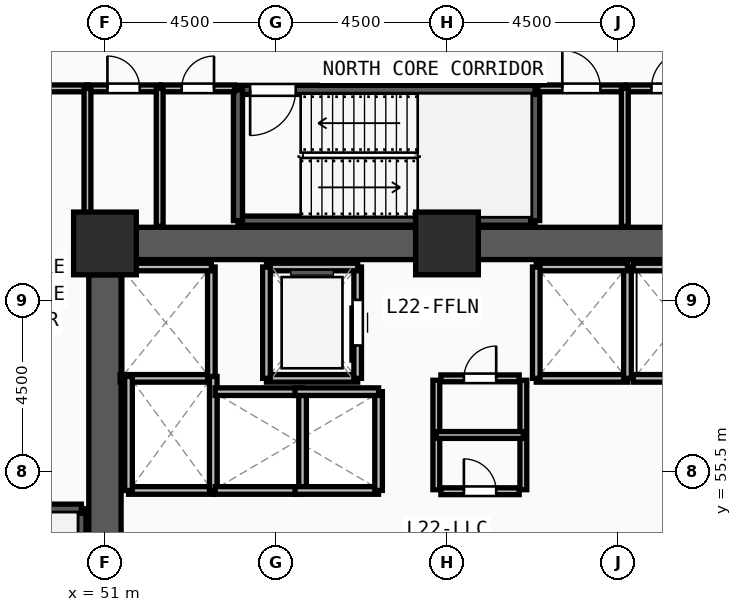
"""IFC4 building model, lengths in metres.
Left out: names, types, materials, properties, quantities, classifications, styles, units other than length and angle.
Written with IfcOpenShell. Run it as: python <this file> out.ifc"""

import sys

from ifc_helpers import new_model, si_unit, direction, frame, frame_2d, origin, origin_2d, place, context, subcontext, project, spatial, rectangle, extrude, source, transform, mapped, element, fill, save


model = new_model("IFC4")
c1 = context("Model", 3, precision=1e-05, world=origin(), true_north=direction((0.0, 1.0)))
c2 = subcontext(c1, "Body", "Model", "MODEL_VIEW")
j1 = project(units=[si_unit("LENGTHUNIT", "METRE"), si_unit("PLANEANGLEUNIT", "RADIAN")], contexts=[c1])
p1 = place(None, origin())
s1 = spatial("IfcSite", under=j1, at=p1, CompositionType="ELEMENT")
p2 = place(p1, origin())
s2 = spatial("IfcBuilding", under=s1, at=p2, CompositionType="ELEMENT")
p3 = place(p2, frame((0.0, 0.0, 85.5)))
s3 = spatial("IfcBuildingStorey", under=s2, at=p3, CompositionType="ELEMENT", Elevation=85.5)
m1 = source(origin(), c2, "Body", "SweptSolid", [
    extrude(rectangle(XDim=1.65, YDim=1.65, at=origin_2d()), origin(), (0.0, 0.0, 1.0), 3.75),
])
for number, where, z_axis, x_axis in (
    (1, (60.0, 61.5, 0.0), (0.0, 0.0, 1.0), (1.0, 0.0, 0.0)),
    (2, (51.0, 61.5, 0.0), (0.0, 0.0, 1.0), (1.0, 0.0, 0.0)),
):
    element("IfcColumn", number, at=place(p3, frame(where, z_axis=z_axis, x_axis=x_axis)), inside=s3, PredefinedType="COLUMN", context=c2, shape_type="MappedRepresentation", body=[
        mapped(m1, transform((0.0, 0.0, 0.0), x_axis=(1.0, 0.0, 0.0), y_axis=(0.0, 1.0, 0.0), z_axis=(0.0, 0.0, 1.0), scale=1.0)),
    ])
for number, where, z_axis, x_axis in (
    (3, (51.825, 61.5, 0.0), (0.0, 0.0, 1.0), (1.0, 0.0, 0.0)),
    (4, (60.825, 61.5, 0.0), (0.0, 0.0, 1.0), (1.0, 0.0, 0.0)),
):
    element("IfcWall", number, at=place(p3, frame(where, z_axis=z_axis, x_axis=x_axis)), inside=s3, PredefinedType="SHEAR", context=c2, shape_type="SweptSolid", body=[
        extrude(rectangle(XDim=7.35, YDim=0.85, at=frame_2d((3.675, 0.0))), origin(), (0.0, 0.0, 1.0), 3.57),
    ])
p4 = place(p3, frame((51.0, 47.325, 0.0), z_axis=(0.0, 0.0, 1.0), x_axis=(0.0, 1.0, 0.0)))
e5 = element("IfcWall", 5, at=p4, inside=s3, PredefinedType="SHEAR", context=c2, shape_type="SweptSolid", body=[
    extrude(rectangle(XDim=13.35, YDim=0.85, at=frame_2d((6.675, 0.0))), origin(), (0.0, 0.0, 1.0), 3.57),
])
p5 = place(p3, frame((50.38, 46.7, 0.0), z_axis=(0.0, 0.0, 1.0), x_axis=(0.0, 1.0, 0.0)))
e6 = element("IfcWall", 6, at=p5, inside=s3, PredefinedType="SOLIDWALL", context=c2, shape_type="SweptSolid", body=[
    extrude(rectangle(XDim=7.82, YDim=0.24, at=frame_2d((3.91, 0.0))), origin(), (0.0, 0.0, 1.0), 3.57),
])
p6 = place(p3, frame((50.38, 54.52, 0.0), z_axis=(0.0, 0.0, 1.0), x_axis=(-1.0, 0.0, 0.0)))
e7 = element("IfcWall", 7, at=p6, inside=s3, PredefinedType="SOLIDWALL", context=c2, shape_type="SweptSolid", body=[
    extrude(rectangle(XDim=3.44, YDim=0.24, at=frame_2d((1.72, 0.0))), origin(), (0.0, 0.0, 1.0), 3.57),
])
p7 = place(p3, frame((54.5, 62.1, 0.0), z_axis=(0.0, 0.0, 1.0), x_axis=(1.0, 0.0, 0.0)))
e8 = element("IfcWall", 8, at=p7, inside=s3, PredefinedType="SOLIDWALL", context=c2, shape_type="SweptSolid", body=[
    extrude(rectangle(XDim=7.82, YDim=0.24, at=frame_2d((3.91, 0.0))), origin(), (0.0, 0.0, 1.0), 3.57),
])
p8 = place(p3, frame((62.32, 62.1, 0.0), z_axis=(0.0, 0.0, 1.0), x_axis=(0.0, 1.0, 0.0)))
e9 = element("IfcWall", 9, at=p8, inside=s3, PredefinedType="SOLIDWALL", context=c2, shape_type="SweptSolid", body=[
    extrude(rectangle(XDim=3.44, YDim=0.24, at=frame_2d((1.72, 0.0))), origin(), (0.0, 0.0, 1.0), 3.57),
])
p9 = place(p3, frame((62.32, 65.54, 0.0), z_axis=(0.0, 0.0, 1.0), x_axis=(-1.0, 0.0, 0.0)))
e10 = element("IfcWall", 10, at=p9, inside=s3, PredefinedType="SOLIDWALL", context=c2, shape_type="SweptSolid", body=[
    extrude(rectangle(XDim=7.82, YDim=0.24, at=frame_2d((3.91, 0.0))), origin(), (0.0, 0.0, 1.0), 3.57),
])
m2 = source(origin(), c2, "Body", "SweptSolid", [
    extrude(rectangle(XDim=1.2, YDim=2.2, at=frame_2d((0.6, 1.1))), frame((0.0, 0.13, 0.0), z_axis=(0.0, -1.0, 0.0), x_axis=(1.0, 0.0, 0.0)), (0.0, 0.0, 1.0), 0.26),
])
p10 = place(p9, frame((6.3, 0.0, 0.0)))
e11 = element("IfcOpeningElement", 11, at=p10, cuts=e10, PredefinedType="OPENING", context=c2, shape_type="MappedRepresentation", body=[
    mapped(m2, transform((0.0, 0.0, 0.0), x_axis=(1.0, 0.0, 0.0), y_axis=(0.0, 1.0, 0.0), z_axis=(0.0, 0.0, 1.0), scale=1.0)),
])
p11 = place(p3, frame((54.5, 65.54, 0.0), z_axis=(0.0, 0.0, 1.0), x_axis=(0.0, -1.0, 0.0)))
e12 = element("IfcWall", 12, at=p11, inside=s3, PredefinedType="SOLIDWALL", context=c2, shape_type="SweptSolid", body=[
    extrude(rectangle(XDim=3.44, YDim=0.24, at=frame_2d((1.72, 0.0))), origin(), (0.0, 0.0, 1.0), 3.57),
])
p12 = place(p3, frame((55.25, 57.95, 0.0), z_axis=(0.0, 0.0, 1.0), x_axis=(1.0, 0.0, 0.0)))
e13 = element("IfcWall", 13, at=p12, inside=s3, PredefinedType="SOLIDWALL", context=c2, shape_type="SweptSolid", body=[
    extrude(rectangle(XDim=2.4, YDim=0.2, at=frame_2d((1.2, 0.0))), origin(), (0.0, 0.0, 1.0), 3.57),
])
p13 = place(p3, frame((57.65, 57.95, 0.0), z_axis=(0.0, 0.0, 1.0), x_axis=(0.0, 1.0, 0.0)))
e14 = element("IfcWall", 14, at=p13, inside=s3, PredefinedType="SOLIDWALL", context=c2, shape_type="SweptSolid", body=[
    extrude(rectangle(XDim=2.93, YDim=0.2, at=frame_2d((1.465, 0.0))), origin(), (0.0, 0.0, 1.0), 3.57),
])
m3 = source(origin(), c2, "Body", "SweptSolid", [
    extrude(rectangle(XDim=1.2, YDim=2.3, at=frame_2d((0.6, 1.15))), frame((0.0, 0.11, 0.0), z_axis=(0.0, -1.0, 0.0), x_axis=(1.0, 0.0, 0.0)), (0.0, 0.0, 1.0), 0.22),
])
p14 = place(p13, frame((0.865, 0.0, 0.0)))
e15 = element("IfcOpeningElement", 15, at=p14, cuts=e14, PredefinedType="OPENING", context=c2, shape_type="MappedRepresentation", body=[
    mapped(m3, transform((0.0, 0.0, 0.0), x_axis=(1.0, 0.0, 0.0), y_axis=(0.0, 1.0, 0.0), z_axis=(0.0, 0.0, 1.0), scale=1.0)),
])
p15 = place(p3, frame((57.65, 60.88, 0.0), z_axis=(0.0, 0.0, 1.0), x_axis=(-1.0, 0.0, 0.0)))
e16 = element("IfcWall", 16, at=p15, inside=s3, PredefinedType="SOLIDWALL", context=c2, shape_type="SweptSolid", body=[
    extrude(rectangle(XDim=2.4, YDim=0.2, at=frame_2d((1.2, 0.0))), origin(), (0.0, 0.0, 1.0), 3.57),
])
p16 = place(p3, frame((55.25, 60.88, 0.0), z_axis=(0.0, 0.0, 1.0), x_axis=(0.0, -1.0, 0.0)))
e17 = element("IfcWall", 17, at=p16, inside=s3, PredefinedType="SOLIDWALL", context=c2, shape_type="SweptSolid", body=[
    extrude(rectangle(XDim=2.93, YDim=0.2, at=frame_2d((1.465, 0.0))), origin(), (0.0, 0.0, 1.0), 3.57),
])
p17 = place(p3, frame((62.35, 57.95, 0.0), z_axis=(0.0, 0.0, 1.0), x_axis=(1.0, 0.0, 0.0)))
e18 = element("IfcWall", 18, at=p17, inside=s3, PredefinedType="SOLIDWALL", context=c2, shape_type="SweptSolid", body=[
    extrude(rectangle(XDim=2.4, YDim=0.2, at=frame_2d((1.2, 0.0))), origin(), (0.0, 0.0, 1.0), 3.57),
])
p18 = place(p3, frame((64.75, 57.95, 0.0), z_axis=(0.0, 0.0, 1.0), x_axis=(0.0, 1.0, 0.0)))
e19 = element("IfcWall", 19, at=p18, inside=s3, PredefinedType="SOLIDWALL", context=c2, shape_type="SweptSolid", body=[
    extrude(rectangle(XDim=2.93, YDim=0.2, at=frame_2d((1.465, 0.0))), origin(), (0.0, 0.0, 1.0), 3.57),
])
p19 = place(p3, frame((64.75, 60.88, 0.0), z_axis=(0.0, 0.0, 1.0), x_axis=(-1.0, 0.0, 0.0)))
e20 = element("IfcWall", 20, at=p19, inside=s3, PredefinedType="SOLIDWALL", context=c2, shape_type="SweptSolid", body=[
    extrude(rectangle(XDim=2.4, YDim=0.2, at=frame_2d((1.2, 0.0))), origin(), (0.0, 0.0, 1.0), 3.57),
])
p20 = place(p3, frame((62.35, 60.88, 0.0), z_axis=(0.0, 0.0, 1.0), x_axis=(0.0, -1.0, 0.0)))
e21 = element("IfcWall", 21, at=p20, inside=s3, PredefinedType="SOLIDWALL", context=c2, shape_type="SweptSolid", body=[
    extrude(rectangle(XDim=2.93, YDim=0.2, at=frame_2d((1.465, 0.0))), origin(), (0.0, 0.0, 1.0), 3.57),
])
for number, where, z_axis, x_axis in (
    (22, (64.9, 57.95, 0.0), (0.0, 0.0, 1.0), (1.0, 0.0, 0.0)),
    (23, (67.3, 60.88, 0.0), (0.0, 0.0, 1.0), (-1.0, 0.0, 0.0)),
    (24, (51.4, 57.95, 0.0), (0.0, 0.0, 1.0), (1.0, 0.0, 0.0)),
):
    element("IfcWall", number, at=place(p3, frame(where, z_axis=z_axis, x_axis=x_axis)), inside=s3, PredefinedType="SOLIDWALL", context=c2, shape_type="SweptSolid", body=[
        extrude(rectangle(XDim=2.4, YDim=0.2, at=frame_2d((1.2, 0.0))), origin(), (0.0, 0.0, 1.0), 3.57),
    ])
p21 = place(p3, frame((53.8, 57.95, 0.0), z_axis=(0.0, 0.0, 1.0), x_axis=(0.0, 1.0, 0.0)))
e25 = element("IfcWall", 25, at=p21, inside=s3, PredefinedType="SOLIDWALL", context=c2, shape_type="SweptSolid", body=[
    extrude(rectangle(XDim=2.93, YDim=0.2, at=frame_2d((1.465, 0.0))), origin(), (0.0, 0.0, 1.0), 3.57),
])
p22 = place(p3, frame((53.8, 60.88, 0.0), z_axis=(0.0, 0.0, 1.0), x_axis=(-1.0, 0.0, 0.0)))
e26 = element("IfcWall", 26, at=p22, inside=s3, PredefinedType="SOLIDWALL", context=c2, shape_type="SweptSolid", body=[
    extrude(rectangle(XDim=2.4, YDim=0.2, at=frame_2d((1.2, 0.0))), origin(), (0.0, 0.0, 1.0), 3.57),
])
p23 = place(p3, frame((51.62, 55.0, 0.0), z_axis=(0.0, 0.0, 1.0), x_axis=(1.0, 0.0, 0.0)))
e27 = element("IfcWall", 27, at=p23, inside=s3, PredefinedType="SOLIDWALL", context=c2, shape_type="SweptSolid", body=[
    extrude(rectangle(XDim=2.23, YDim=0.2, at=frame_2d((1.115, 0.0))), origin(), (0.0, 0.0, 1.0), 3.57),
])
for number, where, z_axis, x_axis in (
    (28, (53.85, 55.0, 0.0), (0.0, 0.0, 1.0), (0.0, 1.0, 0.0)),
    (29, (51.62, 58.0, 0.0), (0.0, 0.0, 1.0), (0.0, -1.0, 0.0)),
):
    element("IfcWall", number, at=place(p3, frame(where, z_axis=z_axis, x_axis=x_axis)), inside=s3, PredefinedType="SOLIDWALL", context=c2, shape_type="SweptSolid", body=[
        extrude(rectangle(XDim=3.0, YDim=0.2, at=frame_2d((1.5, 0.0))), origin(), (0.0, 0.0, 1.0), 3.57),
    ])
p24 = place(p3, frame((53.9, 55.0, 0.0), z_axis=(0.0, 0.0, 1.0), x_axis=(1.0, 0.0, 0.0)))
e30 = element("IfcWall", 30, at=p24, inside=s3, PredefinedType="SOLIDWALL", context=c2, shape_type="SweptSolid", body=[
    extrude(rectangle(XDim=2.3, YDim=0.2, at=frame_2d((1.15, 0.0))), origin(), (0.0, 0.0, 1.0), 3.57),
])
p25 = place(p3, frame((56.2, 55.0, 0.0), z_axis=(0.0, 0.0, 1.0), x_axis=(0.0, 1.0, 0.0)))
e31 = element("IfcWall", 31, at=p25, inside=s3, PredefinedType="SOLIDWALL", context=c2, shape_type="SweptSolid", body=[
    extrude(rectangle(XDim=2.6, YDim=0.2, at=frame_2d((1.3, 0.0))), origin(), (0.0, 0.0, 1.0), 3.57),
])
p26 = place(p3, frame((56.2, 57.6, 0.0), z_axis=(0.0, 0.0, 1.0), x_axis=(-1.0, 0.0, 0.0)))
e32 = element("IfcWall", 32, at=p26, inside=s3, PredefinedType="SOLIDWALL", context=c2, shape_type="SweptSolid", body=[
    extrude(rectangle(XDim=2.3, YDim=0.2, at=frame_2d((1.15, 0.0))), origin(), (0.0, 0.0, 1.0), 3.57),
])
p27 = place(p3, frame((56.0, 55.0, 0.0), z_axis=(0.0, 0.0, 1.0), x_axis=(1.0, 0.0, 0.0)))
e33 = element("IfcWall", 33, at=p27, inside=s3, PredefinedType="SOLIDWALL", context=c2, shape_type="SweptSolid", body=[
    extrude(rectangle(XDim=2.2, YDim=0.2, at=frame_2d((1.1, 0.0))), origin(), (0.0, 0.0, 1.0), 3.57),
])
p28 = place(p3, frame((58.2, 55.0, 0.0), z_axis=(0.0, 0.0, 1.0), x_axis=(0.0, 1.0, 0.0)))
e34 = element("IfcWall", 34, at=p28, inside=s3, PredefinedType="SOLIDWALL", context=c2, shape_type="SweptSolid", body=[
    extrude(rectangle(XDim=2.6, YDim=0.2, at=frame_2d((1.3, 0.0))), origin(), (0.0, 0.0, 1.0), 3.57),
])
p29 = place(p3, frame((58.2, 57.6, 0.0), z_axis=(0.0, 0.0, 1.0), x_axis=(-1.0, 0.0, 0.0)))
e35 = element("IfcWall", 35, at=p29, inside=s3, PredefinedType="SOLIDWALL", context=c2, shape_type="SweptSolid", body=[
    extrude(rectangle(XDim=2.2, YDim=0.2, at=frame_2d((1.1, 0.0))), origin(), (0.0, 0.0, 1.0), 3.57),
])
p30 = place(p3, frame((59.84, 54.98, 0.0), z_axis=(0.0, 0.0, 1.0), x_axis=(1.0, 0.0, 0.0)))
e36 = element("IfcWall", 36, at=p30, inside=s3, PredefinedType="PARTITIONING", context=c2, shape_type="SweptSolid", body=[
    extrude(rectangle(XDim=2.06, YDim=0.18, at=frame_2d((1.03, 0.0))), origin(), (0.0, 0.0, 1.0), 3.57),
])
m4 = source(origin(), c2, "Body", "SweptSolid", [
    extrude(rectangle(XDim=0.85, YDim=2.1, at=frame_2d((0.425, 1.05))), frame((0.0, 0.1, 0.0), z_axis=(0.0, -1.0, 0.0), x_axis=(1.0, 0.0, 0.0)), (0.0, 0.0, 1.0), 0.2),
])
p31 = place(p30, frame((0.605, 0.0, 0.0)))
e37 = element("IfcOpeningElement", 37, at=p31, cuts=e36, PredefinedType="OPENING", context=c2, shape_type="MappedRepresentation", body=[
    mapped(m4, transform((0.0, 0.0, 0.0), x_axis=(1.0, 0.0, 0.0), y_axis=(0.0, 1.0, 0.0), z_axis=(0.0, 0.0, 1.0), scale=1.0)),
])
p32 = place(p3, frame((59.84, 57.95, 0.0), z_axis=(0.0, 0.0, 1.0), x_axis=(1.0, 0.0, 0.0)))
e38 = element("IfcWall", 38, at=p32, inside=s3, PredefinedType="PARTITIONING", context=c2, shape_type="SweptSolid", body=[
    extrude(rectangle(XDim=2.06, YDim=0.18, at=frame_2d((1.03, 0.0))), origin(), (0.0, 0.0, 1.0), 3.57),
])
p33 = place(p32, frame((0.605, 0.0, 0.0)))
e39 = element("IfcOpeningElement", 39, at=p33, cuts=e38, PredefinedType="OPENING", context=c2, shape_type="MappedRepresentation", body=[
    mapped(m4, transform((0.0, 0.0, 0.0), x_axis=(1.0, 0.0, 0.0), y_axis=(0.0, 1.0, 0.0), z_axis=(0.0, 0.0, 1.0), scale=1.0)),
])
p34 = place(p3, frame((50.54, 65.58, 0.0), z_axis=(0.0, 0.0, 1.0), x_axis=(1.0, 0.0, 0.0)))
e40 = element("IfcWall", 40, at=p34, inside=s3, PredefinedType="PARTITIONING", context=c2, shape_type="SweptSolid", body=[
    extrude(rectangle(XDim=1.9, YDim=0.18, at=frame_2d((0.95, 0.0))), origin(), (0.0, 0.0, 1.0), 3.57),
])
p35 = place(p34, frame((0.525, 0.0, 0.0)))
e41 = element("IfcOpeningElement", 41, at=p35, cuts=e40, PredefinedType="OPENING", context=c2, shape_type="MappedRepresentation", body=[
    mapped(m4, transform((0.0, 0.0, 0.0), x_axis=(1.0, 0.0, 0.0), y_axis=(0.0, 1.0, 0.0), z_axis=(0.0, 0.0, 1.0), scale=1.0)),
])
p36 = place(p3, frame((52.48, 65.58, 0.0), z_axis=(0.0, 0.0, 1.0), x_axis=(1.0, 0.0, 0.0)))
e42 = element("IfcWall", 42, at=p36, inside=s3, PredefinedType="PARTITIONING", context=c2, shape_type="SweptSolid", body=[
    extrude(rectangle(XDim=1.93, YDim=0.18, at=frame_2d((0.965, 0.0))), origin(), (0.0, 0.0, 1.0), 3.57),
])
p37 = place(p36, frame((0.54, 0.0, 0.0)))
e43 = element("IfcOpeningElement", 43, at=p37, cuts=e42, PredefinedType="OPENING", context=c2, shape_type="MappedRepresentation", body=[
    mapped(m4, transform((0.0, 0.0, 0.0), x_axis=(1.0, 0.0, 0.0), y_axis=(0.0, 1.0, 0.0), z_axis=(0.0, 0.0, 1.0), scale=1.0)),
])
p38 = place(p3, frame((62.39, 65.58, 0.0), z_axis=(0.0, 0.0, 1.0), x_axis=(1.0, 0.0, 0.0)))
e44 = element("IfcWall", 44, at=p38, inside=s3, PredefinedType="PARTITIONING", context=c2, shape_type="SweptSolid", body=[
    extrude(rectangle(XDim=2.29, YDim=0.18, at=frame_2d((1.145, 0.0))), origin(), (0.0, 0.0, 1.0), 3.57),
])
m5 = source(origin(), c2, "Body", "SweptSolid", [
    extrude(rectangle(XDim=1.0, YDim=2.2, at=frame_2d((0.5, 1.1))), frame((0.0, 0.1, 0.0), z_axis=(0.0, -1.0, 0.0), x_axis=(1.0, 0.0, 0.0)), (0.0, 0.0, 1.0), 0.2),
])
p39 = place(p38, frame((0.645, 0.0, 0.0)))
e45 = element("IfcOpeningElement", 45, at=p39, cuts=e44, PredefinedType="OPENING", context=c2, shape_type="MappedRepresentation", body=[
    mapped(m5, transform((0.0, 0.0, 0.0), x_axis=(1.0, 0.0, 0.0), y_axis=(0.0, 1.0, 0.0), z_axis=(0.0, 0.0, 1.0), scale=1.0)),
])
p40 = place(p3, frame((64.72, 65.58, 0.0), z_axis=(0.0, 0.0, 1.0), x_axis=(1.0, 0.0, 0.0)))
e46 = element("IfcWall", 46, at=p40, inside=s3, PredefinedType="PARTITIONING", context=c2, shape_type="SweptSolid", body=[
    extrude(rectangle(XDim=2.32, YDim=0.18, at=frame_2d((1.16, 0.0))), origin(), (0.0, 0.0, 1.0), 3.57),
])
p41 = place(p40, frame((0.66, 0.0, 0.0)))
e47 = element("IfcOpeningElement", 47, at=p41, cuts=e46, PredefinedType="OPENING", context=c2, shape_type="MappedRepresentation", body=[
    mapped(m5, transform((0.0, 0.0, 0.0), x_axis=(1.0, 0.0, 0.0), y_axis=(0.0, 1.0, 0.0), z_axis=(0.0, 0.0, 1.0), scale=1.0)),
])
p42 = place(p3, frame((46.7, 65.58, 0.0), z_axis=(0.0, 0.0, 1.0), x_axis=(1.0, 0.0, 0.0)))
e48 = element("IfcWall", 48, at=p42, inside=s3, PredefinedType="PARTITIONING", context=c2, shape_type="SweptSolid", body=[
    extrude(rectangle(XDim=3.84, YDim=0.18, at=frame_2d((1.92, 0.0))), origin(), (0.0, 0.0, 1.0), 3.57),
])
m6 = source(origin(), c2, "Body", "SweptSolid", [
    extrude(rectangle(XDim=1.3, YDim=2.2, at=frame_2d((0.65, 1.1))), frame((0.0, 0.1, 0.0), z_axis=(0.0, -1.0, 0.0), x_axis=(1.0, 0.0, 0.0)), (0.0, 0.0, 1.0), 0.2),
])
p43 = place(p42, frame((1.27, 0.0, 0.0)))
e49 = element("IfcOpeningElement", 49, at=p43, cuts=e48, PredefinedType="OPENING", context=c2, shape_type="MappedRepresentation", body=[
    mapped(m6, transform((0.0, 0.0, 0.0), x_axis=(1.0, 0.0, 0.0), y_axis=(0.0, 1.0, 0.0), z_axis=(0.0, 0.0, 1.0), scale=1.0)),
])
for number, where, z_axis, x_axis in (
    (50, (59.72, 55.02, 0.0), (0.0, 0.0, 1.0), (0.0, 1.0, 0.0)),
    (51, (62.01, 55.02, 0.0), (0.0, 0.0, 1.0), (0.0, 1.0, 0.0)),
):
    element("IfcWall", number, at=place(p3, frame(where, z_axis=z_axis, x_axis=x_axis)), inside=s3, PredefinedType="PARTITIONING", context=c2, shape_type="SweptSolid", body=[
        extrude(rectangle(XDim=2.88, YDim=0.18, at=frame_2d((1.44, 0.0))), origin(), (0.0, 0.0, 1.0), 3.57),
    ])
p44 = place(p3, frame((59.72, 56.46, 0.0), z_axis=(0.0, 0.0, 1.0), x_axis=(1.0, 0.0, 0.0)))
e52 = element("IfcWall", 52, at=p44, inside=s3, PredefinedType="PARTITIONING", context=c2, shape_type="SweptSolid", body=[
    extrude(rectangle(XDim=2.29, YDim=0.18, at=frame_2d((1.145, 0.0))), origin(), (0.0, 0.0, 1.0), 3.57),
])
for number, where, z_axis, x_axis in (
    (53, (50.54, 61.95, 0.0), (0.0, 0.0, 1.0), (0.0, 1.0, 0.0)),
    (54, (52.44, 61.95, 0.0), (0.0, 0.0, 1.0), (0.0, 1.0, 0.0)),
    (55, (64.68, 61.95, 0.0), (0.0, 0.0, 1.0), (0.0, 1.0, 0.0)),
):
    element("IfcWall", number, at=place(p3, frame(where, z_axis=z_axis, x_axis=x_axis)), inside=s3, PredefinedType="PARTITIONING", context=c2, shape_type="SweptSolid", body=[
        extrude(rectangle(XDim=3.63, YDim=0.18, at=frame_2d((1.815, 0.0))), origin(), (0.0, 0.0, 1.0), 3.57),
    ])
m7 = source(origin(), c2, "Body", "SweptSolid", [
    extrude(rectangle(XDim=1.2, YDim=2.2, at=frame_2d((0.6, 1.1))), frame((0.0, 0.025, 0.0), z_axis=(0.0, -1.0, 0.0), x_axis=(1.0, 0.0, 0.0)), (0.0, 0.0, 1.0), 0.05),
])
p45 = place(p10, origin())
e56 = element("IfcDoor", 56, at=p45, inside=s3, OperationType="SINGLE_SWING_RIGHT", PredefinedType="DOOR", context=c2, shape_type="MappedRepresentation", body=[
    mapped(m7, transform((0.0, 0.0, 0.0), x_axis=(1.0, 0.0, 0.0), y_axis=(0.0, 1.0, 0.0), z_axis=(0.0, 0.0, 1.0), scale=1.0)),
])
fill(e11, e56)
m8 = source(origin(), c2, "Body", "SweptSolid", [
    extrude(rectangle(XDim=1.2, YDim=2.3, at=frame_2d((0.6, 1.15))), frame((0.0, 0.025, 0.0), z_axis=(0.0, -1.0, 0.0), x_axis=(1.0, 0.0, 0.0)), (0.0, 0.0, 1.0), 0.05),
])
p46 = place(p14, origin())
e57 = element("IfcDoor", 57, at=p46, inside=s3, OperationType="SLIDING_TO_LEFT", PredefinedType="DOOR", context=c2, shape_type="MappedRepresentation", body=[
    mapped(m8, transform((0.0, 0.0, 0.0), x_axis=(1.0, 0.0, 0.0), y_axis=(0.0, 1.0, 0.0), z_axis=(0.0, 0.0, 1.0), scale=1.0)),
])
fill(e15, e57)
m9 = source(origin(), c2, "Body", "SweptSolid", [
    extrude(rectangle(XDim=0.85, YDim=2.1, at=frame_2d((0.425, 1.05))), frame((0.0, 0.025, 0.0), z_axis=(0.0, -1.0, 0.0), x_axis=(1.0, 0.0, 0.0)), (0.0, 0.0, 1.0), 0.05),
])
p47 = place(p31, origin())
e58 = element("IfcDoor", 58, at=p47, inside=s3, OperationType="SINGLE_SWING_LEFT", PredefinedType="DOOR", context=c2, shape_type="MappedRepresentation", body=[
    mapped(m9, transform((0.0, 0.0, 0.0), x_axis=(1.0, 0.0, 0.0), y_axis=(0.0, 1.0, 0.0), z_axis=(0.0, 0.0, 1.0), scale=1.0)),
])
fill(e37, e58)
p48 = place(p33, origin())
e59 = element("IfcDoor", 59, at=p48, inside=s3, OperationType="SINGLE_SWING_RIGHT", PredefinedType="DOOR", context=c2, shape_type="MappedRepresentation", body=[
    mapped(m9, transform((0.0, 0.0, 0.0), x_axis=(1.0, 0.0, 0.0), y_axis=(0.0, 1.0, 0.0), z_axis=(0.0, 0.0, 1.0), scale=1.0)),
])
fill(e39, e59)
p49 = place(p35, origin())
e60 = element("IfcDoor", 60, at=p49, inside=s3, OperationType="SINGLE_SWING_LEFT", PredefinedType="DOOR", context=c2, shape_type="MappedRepresentation", body=[
    mapped(m9, transform((0.0, 0.0, 0.0), x_axis=(1.0, 0.0, 0.0), y_axis=(0.0, 1.0, 0.0), z_axis=(0.0, 0.0, 1.0), scale=1.0)),
])
fill(e41, e60)
p50 = place(p37, origin())
e61 = element("IfcDoor", 61, at=p50, inside=s3, OperationType="SINGLE_SWING_RIGHT", PredefinedType="DOOR", context=c2, shape_type="MappedRepresentation", body=[
    mapped(m9, transform((0.0, 0.0, 0.0), x_axis=(1.0, 0.0, 0.0), y_axis=(0.0, 1.0, 0.0), z_axis=(0.0, 0.0, 1.0), scale=1.0)),
])
fill(e43, e61)
m10 = source(origin(), c2, "Body", "SweptSolid", [
    extrude(rectangle(XDim=1.0, YDim=2.2, at=frame_2d((0.5, 1.1))), frame((0.0, 0.025, 0.0), z_axis=(0.0, -1.0, 0.0), x_axis=(1.0, 0.0, 0.0)), (0.0, 0.0, 1.0), 0.05),
])
p51 = place(p39, origin())
e62 = element("IfcDoor", 62, at=p51, inside=s3, OperationType="SINGLE_SWING_LEFT", PredefinedType="DOOR", context=c2, shape_type="MappedRepresentation", body=[
    mapped(m10, transform((0.0, 0.0, 0.0), x_axis=(1.0, 0.0, 0.0), y_axis=(0.0, 1.0, 0.0), z_axis=(0.0, 0.0, 1.0), scale=1.0)),
])
fill(e45, e62)
p52 = place(p41, origin())
e63 = element("IfcDoor", 63, at=p52, inside=s3, OperationType="SINGLE_SWING_RIGHT", PredefinedType="DOOR", context=c2, shape_type="MappedRepresentation", body=[
    mapped(m10, transform((0.0, 0.0, 0.0), x_axis=(1.0, 0.0, 0.0), y_axis=(0.0, 1.0, 0.0), z_axis=(0.0, 0.0, 1.0), scale=1.0)),
])
fill(e47, e63)
save(model, sys.argv[1])
